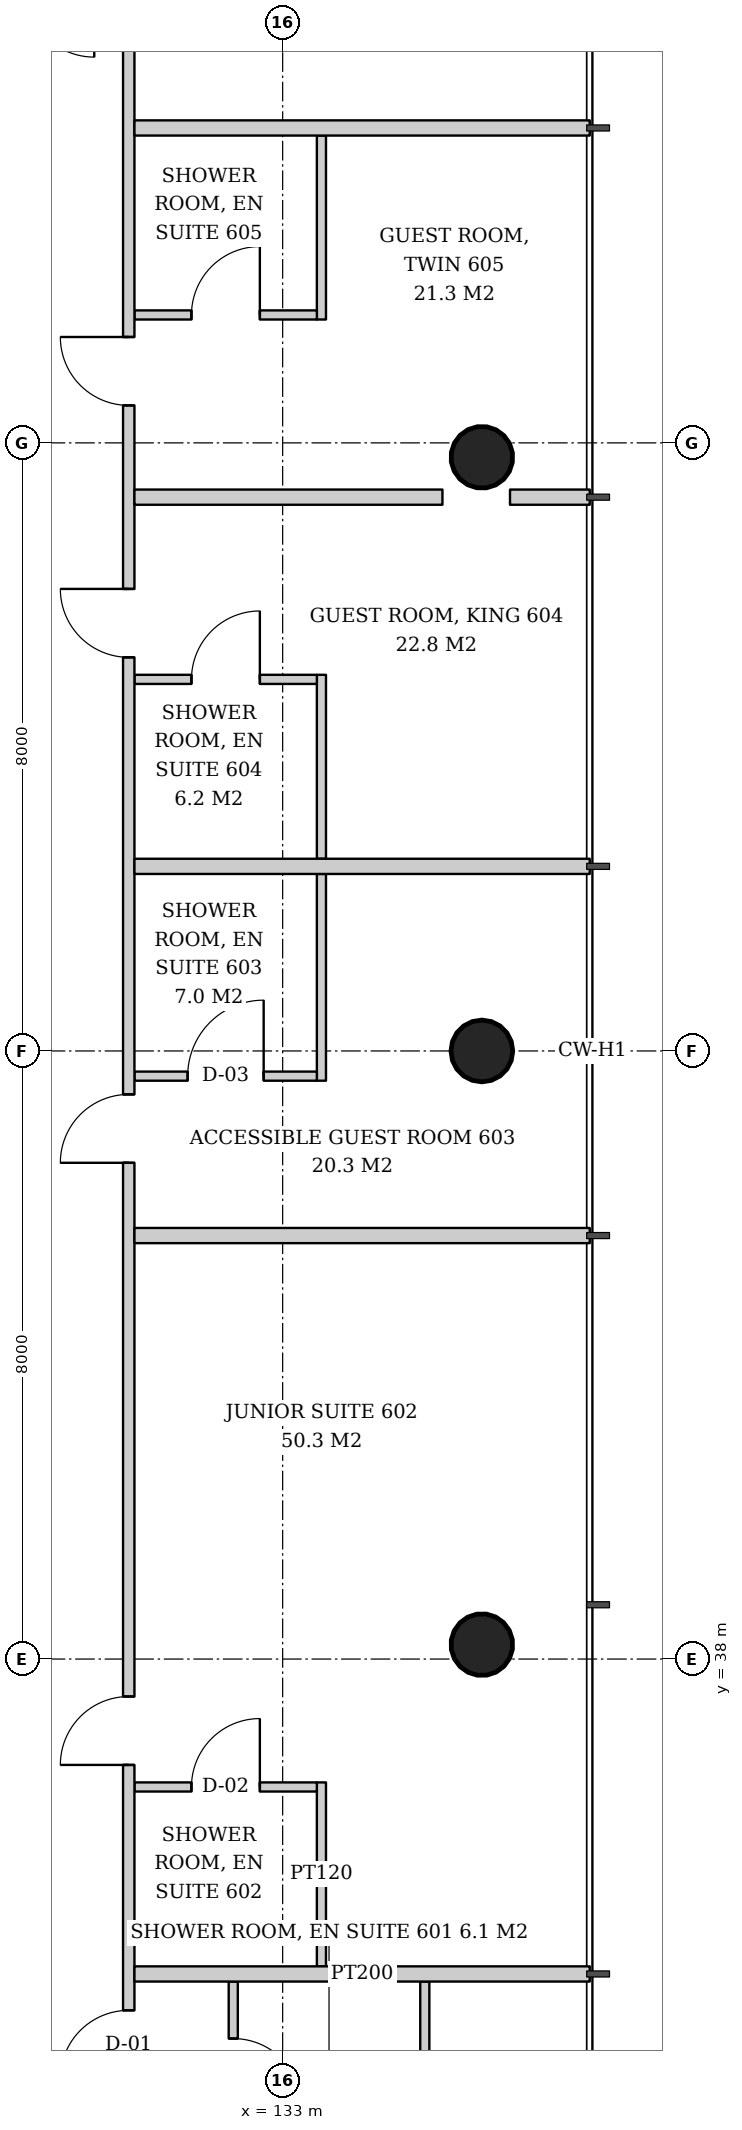
"""IFC4 building model, lengths in metres.
Left out: names, types, materials, properties, quantities, classifications, styles, units other than length and angle.
Written with IfcOpenShell. Run it as: python <this file> out.ifc"""

import sys

from ifc_helpers import new_model, si_unit, direction, frame, frame_2d, origin, origin_2d, place, context, subcontext, project, spatial, rectangle, hollow_circle, extrude, element, fill, save


model = new_model("IFC4")
c1 = context("Model", 3, precision=1e-05, world=origin(), true_north=direction((0.0, 1.0)))
c2 = subcontext(c1, "Body", "Model", "MODEL_VIEW")
j1 = project(units=[si_unit("LENGTHUNIT", "METRE"), si_unit("PLANEANGLEUNIT", "RADIAN")], contexts=[c1])
p1 = place(None, origin())
s1 = spatial("IfcSite", under=j1, at=p1, CompositionType="ELEMENT")
p2 = place(p1, origin())
s2 = spatial("IfcBuilding", under=s1, at=p2, CompositionType="ELEMENT")
p3 = place(p2, frame((0.0, 0.0, 28.6)))
s3 = spatial("IfcBuildingStorey", under=s2, at=p3, CompositionType="ELEMENT", Elevation=28.6)
p4 = place(p3, frame((135.672, 38.164, 0.0), z_axis=(-0.04306234503, 0.02149908433, 0.998841040313), x_axis=(-0.446680166538, -0.894693706707, 0.0)))
e1 = element("IfcColumn", 1, at=p4, inside=s3, PredefinedType="COLUMN", context=c2, shape_type="SweptSolid", body=[
    extrude(hollow_circle(Radius=0.406, WallThickness=0.03, at=origin_2d()), origin(), (0.0, 0.0, 1.0), 3.804),
])
p5 = place(p3, frame((135.672, 46.0, 0.0), z_axis=(-0.043072300418, 0.0, 0.999071957837), x_axis=(0.0, -1.0, 0.0)))
e2 = element("IfcColumn", 2, at=p5, inside=s3, PredefinedType="COLUMN", context=c2, shape_type="SweptSolid", body=[
    extrude(hollow_circle(Radius=0.406, WallThickness=0.03, at=origin_2d()), origin(), (0.0, 0.0, 1.0), 3.803),
])
p6 = place(p3, frame((135.672, 53.836, 0.0), z_axis=(-0.04306234503, -0.02149908433, 0.998841040313), x_axis=(0.446680166538, -0.894693706707, 0.0)))
e3 = element("IfcColumn", 3, at=p6, inside=s3, PredefinedType="COLUMN", context=c2, shape_type="SweptSolid", body=[
    extrude(hollow_circle(Radius=0.406, WallThickness=0.03, at=origin_2d()), origin(), (0.0, 0.0, 1.0), 3.804),
])
p7 = place(p3, frame((132.35, 33.757, 0.0), z_axis=(0.0, 0.0, 1.0), x_axis=(0.0, -1.0, 0.0)))
e4 = element("IfcWall", 4, at=p7, inside=s3, PredefinedType="PARTITIONING", context=c2, shape_type="SweptSolid", body=[
    extrude(rectangle(XDim=2.057, YDim=0.12, at=frame_2d((1.029, 0.0))), origin(), (0.0, 0.0, 1.0), 3.6),
])
p8 = place(p7, frame((0.75, 0.0, 0.0)))
e5 = element("IfcOpeningElement", 5, at=p8, cuts=e4, PredefinedType="OPENING", context=c2, shape_type="SweptSolid", body=[
    extrude(rectangle(XDim=0.9, YDim=2.1, at=frame_2d((0.45, 1.05))), frame((0.0, 0.07, 0.0), z_axis=(0.0, -1.0, 0.0), x_axis=(1.0, 0.0, 0.0)), (0.0, 0.0, 1.0), 0.14),
])
p9 = place(p3, frame((134.87, 33.757, 0.0), z_axis=(0.0, 0.0, 1.0), x_axis=(0.0, -1.0, 0.0)))
e6 = element("IfcWall", 6, at=p9, inside=s3, PredefinedType="PARTITIONING", context=c2, shape_type="SweptSolid", body=[
    extrude(rectangle(XDim=2.58, YDim=0.12, at=frame_2d((1.29, 0.0))), origin(), (0.0, 0.0, 1.0), 3.6),
])
p10 = place(p3, frame((133.51, 33.957, 0.0), z_axis=(0.0, 0.0, 1.0), x_axis=(0.0, 1.0, 0.0)))
e7 = element("IfcWall", 7, at=p10, inside=s3, PredefinedType="PARTITIONING", context=c2, shape_type="SweptSolid", body=[
    extrude(rectangle(XDim=2.42, YDim=0.12, at=frame_2d((1.21, 0.0))), origin(), (0.0, 0.0, 1.0), 3.6),
])
p11 = place(p3, frame((131.05, 36.317, 0.0), z_axis=(0.0, 0.0, 1.0), x_axis=(1.0, 0.0, 0.0)))
e8 = element("IfcWall", 8, at=p11, inside=s3, PredefinedType="PARTITIONING", context=c2, shape_type="SweptSolid", body=[
    extrude(rectangle(XDim=2.4, YDim=0.12, at=frame_2d((1.2, 0.0))), origin(), (0.0, 0.0, 1.0), 2.847),
])
p12 = place(p11, frame((0.75, 0.0, 0.0)))
e9 = element("IfcOpeningElement", 9, at=p12, cuts=e8, PredefinedType="OPENING", context=c2, shape_type="SweptSolid", body=[
    extrude(rectangle(XDim=0.9, YDim=2.1, at=frame_2d((0.45, 1.05))), frame((0.0, 0.07, 0.0), z_axis=(0.0, -1.0, 0.0), x_axis=(1.0, 0.0, 0.0)), (0.0, 0.0, 1.0), 0.14),
])
p13 = place(p3, frame((133.51, 45.609, 0.0), z_axis=(0.0, 0.0, 1.0), x_axis=(0.0, 1.0, 0.0)))
e10 = element("IfcWall", 10, at=p13, inside=s3, PredefinedType="PARTITIONING", context=c2, shape_type="SweptSolid", body=[
    extrude(rectangle(XDim=2.72, YDim=0.12, at=frame_2d((1.36, 0.0))), origin(), (0.0, 0.0, 1.0), 3.6),
])
p14 = place(p3, frame((131.05, 45.668, 0.0), z_axis=(0.0, 0.0, 1.0), x_axis=(1.0, 0.0, 0.0)))
e11 = element("IfcWall", 11, at=p14, inside=s3, PredefinedType="PARTITIONING", context=c2, shape_type="SweptSolid", body=[
    extrude(rectangle(XDim=2.4, YDim=0.12, at=frame_2d((1.2, 0.0))), origin(), (0.0, 0.0, 1.0), 3.6),
])
p15 = place(p14, frame((0.7, 0.0, 0.0)))
e12 = element("IfcOpeningElement", 12, at=p15, cuts=e11, PredefinedType="OPENING", context=c2, shape_type="SweptSolid", body=[
    extrude(rectangle(XDim=1.0, YDim=2.1, at=frame_2d((0.5, 1.05))), frame((0.0, 0.07, 0.0), z_axis=(0.0, -1.0, 0.0), x_axis=(1.0, 0.0, 0.0)), (0.0, 0.0, 1.0), 0.14),
])
p16 = place(p3, frame((133.51, 48.529, 0.0), z_axis=(0.0, 0.0, 1.0), x_axis=(0.0, 1.0, 0.0)))
e13 = element("IfcWall", 13, at=p16, inside=s3, PredefinedType="PARTITIONING", context=c2, shape_type="SweptSolid", body=[
    extrude(rectangle(XDim=2.42, YDim=0.12, at=frame_2d((1.21, 0.0))), origin(), (0.0, 0.0, 1.0), 2.847),
])
p17 = place(p3, frame((131.05, 50.889, 0.0), z_axis=(0.0, 0.0, 1.0), x_axis=(1.0, 0.0, 0.0)))
e14 = element("IfcWall", 14, at=p17, inside=s3, PredefinedType="PARTITIONING", context=c2, shape_type="SweptSolid", body=[
    extrude(rectangle(XDim=2.4, YDim=0.12, at=frame_2d((1.2, 0.0))), origin(), (0.0, 0.0, 1.0), 3.6),
])
p18 = place(p17, frame((0.75, 0.0, 0.0)))
e15 = element("IfcOpeningElement", 15, at=p18, cuts=e14, PredefinedType="OPENING", context=c2, shape_type="SweptSolid", body=[
    extrude(rectangle(XDim=0.9, YDim=2.1, at=frame_2d((0.45, 1.05))), frame((0.0, 0.07, 0.0), z_axis=(0.0, -1.0, 0.0), x_axis=(1.0, 0.0, 0.0)), (0.0, 0.0, 1.0), 0.14),
])
p19 = place(p3, frame((133.51, 55.623, 0.0), z_axis=(0.0, 0.0, 1.0), x_axis=(0.0, 1.0, 0.0)))
e16 = element("IfcWall", 16, at=p19, inside=s3, PredefinedType="PARTITIONING", context=c2, shape_type="SweptSolid", body=[
    extrude(rectangle(XDim=2.42, YDim=0.12, at=frame_2d((1.21, 0.0))), origin(), (0.0, 0.0, 1.0), 2.847),
])
p20 = place(p3, frame((131.05, 55.683, 0.0), z_axis=(0.0, 0.0, 1.0), x_axis=(1.0, 0.0, 0.0)))
e17 = element("IfcWall", 17, at=p20, inside=s3, PredefinedType="PARTITIONING", context=c2, shape_type="SweptSolid", body=[
    extrude(rectangle(XDim=2.4, YDim=0.12, at=frame_2d((1.2, 0.0))), origin(), (0.0, 0.0, 1.0), 3.6),
])
p21 = place(p20, frame((0.75, 0.0, 0.0)))
e18 = element("IfcOpeningElement", 18, at=p21, cuts=e17, PredefinedType="OPENING", context=c2, shape_type="SweptSolid", body=[
    extrude(rectangle(XDim=0.9, YDim=2.1, at=frame_2d((0.45, 1.05))), frame((0.0, 0.07, 0.0), z_axis=(0.0, -1.0, 0.0), x_axis=(1.0, 0.0, 0.0)), (0.0, 0.0, 1.0), 0.14),
])
p22 = place(p3, frame((130.975, 31.95, 0.0), z_axis=(0.0, 0.0, 1.0), x_axis=(0.0, 1.0, 0.0)))
e19 = element("IfcWall", 19, at=p22, inside=s3, PredefinedType="PARTITIONING", context=c2, shape_type="SweptSolid", body=[
    extrude(rectangle(XDim=27.95, YDim=0.15, at=frame_2d((13.975, 0.0))), origin(), (0.0, 0.0, 1.0), 2.8),
])
p23 = place(p22, frame((0.529, 0.0, 0.0)))
e20 = element("IfcOpeningElement", 20, at=p23, cuts=e19, PredefinedType="OPENING", context=c2, shape_type="SweptSolid", body=[
    extrude(rectangle(XDim=0.9, YDim=2.1, at=frame_2d((0.45, 1.05))), frame((0.0, 0.085, 0.0), z_axis=(0.0, -1.0, 0.0), x_axis=(1.0, 0.0, 0.0)), (0.0, 0.0, 1.0), 0.17),
])
p24 = place(p22, frame((4.657, 0.0, 0.0)))
e21 = element("IfcOpeningElement", 21, at=p24, cuts=e19, PredefinedType="OPENING", context=c2, shape_type="SweptSolid", body=[
    extrude(rectangle(XDim=0.9, YDim=2.1, at=frame_2d((0.45, 1.05))), frame((0.0, 0.085, 0.0), z_axis=(0.0, -1.0, 0.0), x_axis=(1.0, 0.0, 0.0)), (0.0, 0.0, 1.0), 0.17),
])
p25 = place(p22, frame((12.579, 0.0, 0.0)))
e22 = element("IfcOpeningElement", 22, at=p25, cuts=e19, PredefinedType="OPENING", context=c2, shape_type="SweptSolid", body=[
    extrude(rectangle(XDim=0.9, YDim=2.1, at=frame_2d((0.45, 1.05))), frame((0.0, 0.085, 0.0), z_axis=(0.0, -1.0, 0.0), x_axis=(1.0, 0.0, 0.0)), (0.0, 0.0, 1.0), 0.17),
])
p26 = place(p22, frame((19.229, 0.0, 0.0)))
e23 = element("IfcOpeningElement", 23, at=p26, cuts=e19, PredefinedType="OPENING", context=c2, shape_type="SweptSolid", body=[
    extrude(rectangle(XDim=0.9, YDim=2.1, at=frame_2d((0.45, 1.05))), frame((0.0, 0.085, 0.0), z_axis=(0.0, -1.0, 0.0), x_axis=(1.0, 0.0, 0.0)), (0.0, 0.0, 1.0), 0.17),
])
p27 = place(p22, frame((22.543, 0.0, 0.0)))
e24 = element("IfcOpeningElement", 24, at=p27, cuts=e19, PredefinedType="OPENING", context=c2, shape_type="SweptSolid", body=[
    extrude(rectangle(XDim=0.9, YDim=2.1, at=frame_2d((0.45, 1.05))), frame((0.0, 0.085, 0.0), z_axis=(0.0, -1.0, 0.0), x_axis=(1.0, 0.0, 0.0)), (0.0, 0.0, 1.0), 0.17),
])
p28 = place(p3, frame((131.05, 33.857, 0.0), z_axis=(0.0, 0.0, 1.0), x_axis=(1.0, 0.0, 0.0)))
e25 = element("IfcWall", 25, at=p28, inside=s3, PredefinedType="PARTITIONING", context=c2, shape_type="SweptSolid", body=[
    extrude(rectangle(XDim=5.99, YDim=0.2, at=frame_2d((2.995, 0.0))), origin(), (0.0, 0.0, 1.0), 2.847),
])
for number, where, z_axis, x_axis in (
    (26, (131.05, 43.572, 0.0), (0.0, 0.0, 1.0), (1.0, 0.0, 0.0)),
    (27, (131.05, 48.428, 0.0), (0.0, 0.0, 1.0), (1.0, 0.0, 0.0)),
):
    element("IfcWall", number, at=place(p3, frame(where, z_axis=z_axis, x_axis=x_axis)), inside=s3, PredefinedType="PARTITIONING", context=c2, shape_type="SweptSolid", body=[
        extrude(rectangle(XDim=5.99, YDim=0.2, at=frame_2d((2.995, 0.0))), origin(), (0.0, 0.0, 1.0), 3.05),
    ])
p29 = place(p3, frame((131.05, 53.286, 0.0), z_axis=(0.0, 0.0, 1.0), x_axis=(1.0, 0.0, 0.0)))
e28 = element("IfcWall", 28, at=p29, inside=s3, PredefinedType="PARTITIONING", context=c2, shape_type="SweptSolid", body=[
    extrude(rectangle(XDim=4.052, YDim=0.2, at=frame_2d((2.026, 0.0))), origin(), (0.0, 0.0, 1.0), 3.6),
])
p30 = place(p3, frame((135.991, 53.286, 0.0), z_axis=(0.0, 0.0, 1.0), x_axis=(1.0, 0.0, 0.0)))
e29 = element("IfcWall", 29, at=p30, inside=s3, PredefinedType="PARTITIONING", context=c2, shape_type="SweptSolid", body=[
    extrude(rectangle(XDim=1.049, YDim=0.2, at=frame_2d((0.524, 0.0))), origin(), (0.0, 0.0, 1.0), 3.6),
])
p31 = place(p3, frame((131.05, 58.143, 0.0), z_axis=(0.0, 0.0, 1.0), x_axis=(1.0, 0.0, 0.0)))
e30 = element("IfcWall", 30, at=p31, inside=s3, PredefinedType="PARTITIONING", context=c2, shape_type="SweptSolid", body=[
    extrude(rectangle(XDim=5.99, YDim=0.2, at=frame_2d((2.995, 0.0))), origin(), (0.0, 0.0, 1.0), 3.05),
])
p32 = place(p8, origin())
e31 = element("IfcDoor", 31, at=p32, inside=s3, OperationType="SINGLE_SWING_RIGHT", PredefinedType="DOOR", context=c2, shape_type="SweptSolid", body=[
    extrude(rectangle(XDim=0.9, YDim=2.1, at=frame_2d((0.45, 1.05))), frame((0.0, 0.025, 0.0), z_axis=(0.0, -1.0, 0.0), x_axis=(1.0, 0.0, 0.0)), (0.0, 0.0, 1.0), 0.05),
])
fill(e5, e31)
p33 = place(p12, origin())
e32 = element("IfcDoor", 32, at=p33, inside=s3, OperationType="SINGLE_SWING_RIGHT", PredefinedType="DOOR", context=c2, shape_type="SweptSolid", body=[
    extrude(rectangle(XDim=0.9, YDim=2.1, at=frame_2d((0.45, 1.05))), frame((0.0, 0.025, 0.0), z_axis=(0.0, -1.0, 0.0), x_axis=(1.0, 0.0, 0.0)), (0.0, 0.0, 1.0), 0.05),
])
fill(e9, e32)
p34 = place(p15, origin())
e33 = element("IfcDoor", 33, at=p34, inside=s3, OperationType="SINGLE_SWING_RIGHT", PredefinedType="DOOR", context=c2, shape_type="SweptSolid", body=[
    extrude(rectangle(XDim=1.0, YDim=2.1, at=frame_2d((0.5, 1.05))), frame((0.0, 0.025, 0.0), z_axis=(0.0, -1.0, 0.0), x_axis=(1.0, 0.0, 0.0)), (0.0, 0.0, 1.0), 0.05),
])
fill(e12, e33)
p35 = place(p18, origin())
e34 = element("IfcDoor", 34, at=p35, inside=s3, OperationType="SINGLE_SWING_RIGHT", PredefinedType="DOOR", context=c2, shape_type="SweptSolid", body=[
    extrude(rectangle(XDim=0.9, YDim=2.1, at=frame_2d((0.45, 1.05))), frame((0.0, 0.025, 0.0), z_axis=(0.0, -1.0, 0.0), x_axis=(1.0, 0.0, 0.0)), (0.0, 0.0, 1.0), 0.05),
])
fill(e15, e34)
p36 = place(p21, origin())
e35 = element("IfcDoor", 35, at=p36, inside=s3, OperationType="SINGLE_SWING_RIGHT", PredefinedType="DOOR", context=c2, shape_type="SweptSolid", body=[
    extrude(rectangle(XDim=0.9, YDim=2.1, at=frame_2d((0.45, 1.05))), frame((0.0, 0.025, 0.0), z_axis=(0.0, -1.0, 0.0), x_axis=(1.0, 0.0, 0.0)), (0.0, 0.0, 1.0), 0.05),
])
fill(e18, e35)
p37 = place(p23, origin())
e36 = element("IfcDoor", 36, at=p37, inside=s3, OperationType="SINGLE_SWING_LEFT", PredefinedType="DOOR", context=c2, shape_type="SweptSolid", body=[
    extrude(rectangle(XDim=0.9, YDim=2.1, at=frame_2d((0.45, 1.05))), frame((0.0, 0.025, 0.0), z_axis=(0.0, -1.0, 0.0), x_axis=(1.0, 0.0, 0.0)), (0.0, 0.0, 1.0), 0.05),
])
fill(e20, e36)
p38 = place(p24, origin())
e37 = element("IfcDoor", 37, at=p38, inside=s3, OperationType="SINGLE_SWING_LEFT", PredefinedType="DOOR", context=c2, shape_type="SweptSolid", body=[
    extrude(rectangle(XDim=0.9, YDim=2.1, at=frame_2d((0.45, 1.05))), frame((0.0, 0.025, 0.0), z_axis=(0.0, -1.0, 0.0), x_axis=(1.0, 0.0, 0.0)), (0.0, 0.0, 1.0), 0.05),
])
fill(e21, e37)
p39 = place(p25, origin())
e38 = element("IfcDoor", 38, at=p39, inside=s3, OperationType="SINGLE_SWING_LEFT", PredefinedType="DOOR", context=c2, shape_type="SweptSolid", body=[
    extrude(rectangle(XDim=0.9, YDim=2.1, at=frame_2d((0.45, 1.05))), frame((0.0, 0.025, 0.0), z_axis=(0.0, -1.0, 0.0), x_axis=(1.0, 0.0, 0.0)), (0.0, 0.0, 1.0), 0.05),
])
fill(e22, e38)
p40 = place(p26, origin())
e39 = element("IfcDoor", 39, at=p40, inside=s3, OperationType="SINGLE_SWING_RIGHT", PredefinedType="DOOR", context=c2, shape_type="SweptSolid", body=[
    extrude(rectangle(XDim=0.9, YDim=2.1, at=frame_2d((0.45, 1.05))), frame((0.0, 0.025, 0.0), z_axis=(0.0, -1.0, 0.0), x_axis=(1.0, 0.0, 0.0)), (0.0, 0.0, 1.0), 0.05),
])
fill(e23, e39)
p41 = place(p27, origin())
e40 = element("IfcDoor", 40, at=p41, inside=s3, OperationType="SINGLE_SWING_RIGHT", PredefinedType="DOOR", context=c2, shape_type="SweptSolid", body=[
    extrude(rectangle(XDim=0.9, YDim=2.1, at=frame_2d((0.45, 1.05))), frame((0.0, 0.025, 0.0), z_axis=(0.0, -1.0, 0.0), x_axis=(1.0, 0.0, 0.0)), (0.0, 0.0, 1.0), 0.05),
])
fill(e24, e40)
save(model, sys.argv[1])
